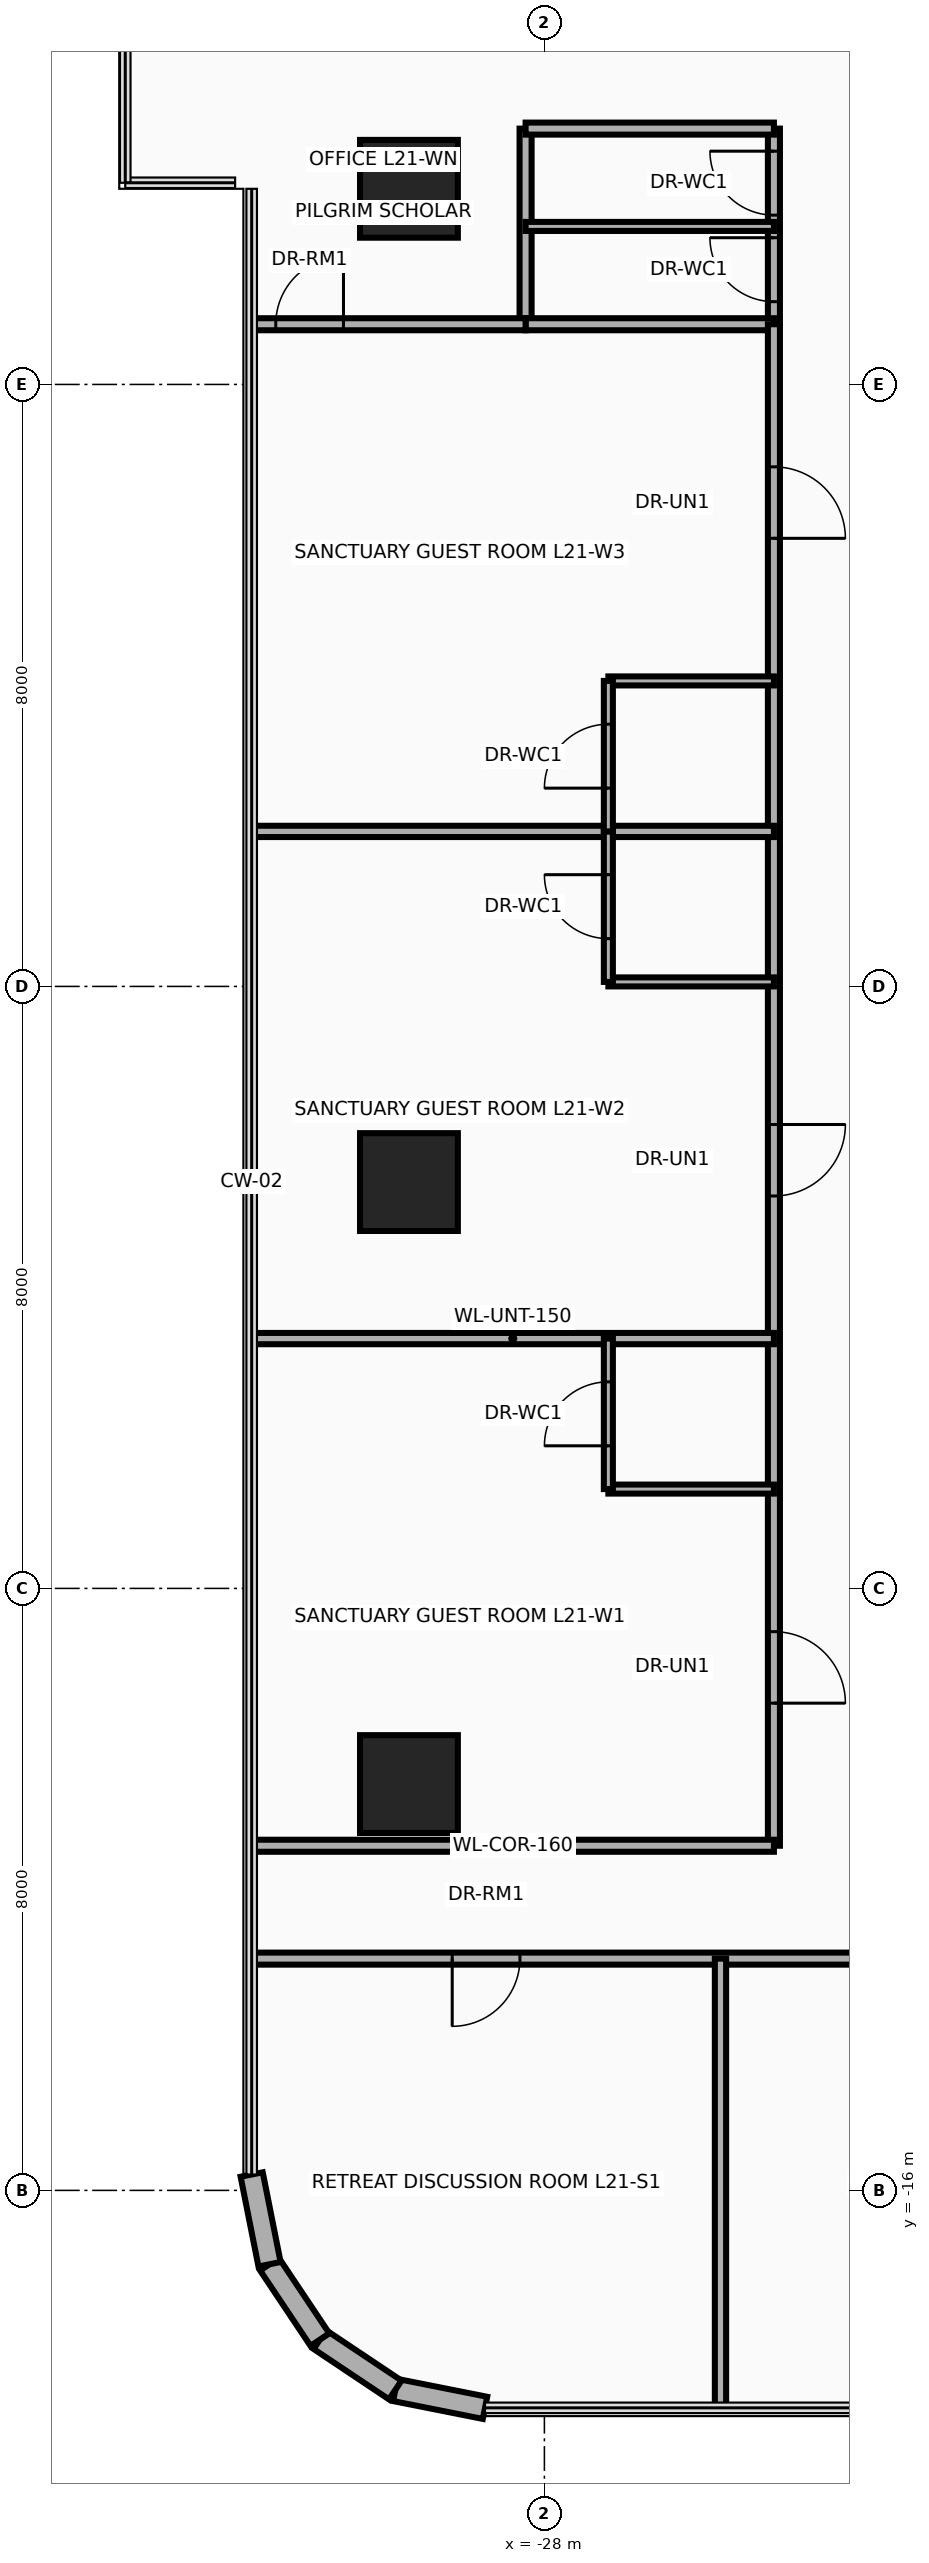
"""IFC4 building model, lengths in metres.
Left out: names, types, materials, properties, quantities, classifications, styles, units other than length and angle.
Written with IfcOpenShell. Run it as: python <this file> out.ifc"""

import sys

from ifc_helpers import new_model, si_unit, direction, frame, frame_2d, origin, origin_2d, place, context, subcontext, project, spatial, rectangle, circle, extrude, source, transform, mapped, element, fill, save


model = new_model("IFC4")
c1 = context("Model", 3, precision=1e-05, world=origin(), true_north=direction((0.0, 1.0)))
c2 = subcontext(c1, "Body", "Model", "MODEL_VIEW")
j1 = project(units=[si_unit("LENGTHUNIT", "METRE"), si_unit("PLANEANGLEUNIT", "RADIAN")], contexts=[c1])
p1 = place(None, origin())
s1 = spatial("IfcSite", under=j1, at=p1, CompositionType="ELEMENT")
p2 = place(p1, origin())
s2 = spatial("IfcBuilding", under=s1, at=p2, CompositionType="ELEMENT")
p3 = place(p2, frame((0.0, 0.0, 85.2)))
s3 = spatial("IfcBuildingStorey", under=s2, at=p3, CompositionType="ELEMENT", Elevation=85.2)
m1 = source(origin(), c2, "Body", "SweptSolid", [
    extrude(circle(Radius=0.65, at=origin_2d()), origin(), (0.0, 0.0, 1.0), 3.7),
])
for number, where, z_axis, x_axis in (
    (1, (-29.8, -10.6, 0.0), (0.0, 0.0, 1.0), (1.0, 0.0, 0.0)),
    (2, (-29.8, -2.6, 0.0), (0.0, 0.0, 1.0), (1.0, 0.0, 0.0)),
    (3, (-29.8, 10.6, 0.0), (0.0, 0.0, 1.0), (1.0, 0.0, 0.0)),
):
    element("IfcColumn", number, at=place(p3, frame(where, z_axis=z_axis, x_axis=x_axis)), inside=s3, PredefinedType="COLUMN", context=c2, shape_type="MappedRepresentation", body=[
        mapped(m1, transform((0.0, 0.0, 0.0), x_axis=(1.0, 0.0, 0.0), y_axis=(0.0, 1.0, 0.0), z_axis=(0.0, 0.0, 1.0), scale=1.0)),
    ])
p4 = place(p3, frame((-28.789, -18.89, 0.0), z_axis=(0.0, 0.0, 1.0), x_axis=(-0.980804027463, 0.194996050505, 0.0)))
e4 = element("IfcWall", 4, at=p4, inside=s3, PredefinedType="SOLIDWALL", context=c2, shape_type="SweptSolid", body=[
    extrude(rectangle(XDim=1.216, YDim=0.3, at=frame_2d((0.608, 0.0))), origin(), (0.0, 0.0, 1.0), 3.46),
])
for number, where, z_axis, x_axis in (
    (5, (-29.982, -18.653, 0.0), (0.0, 0.0, 1.0), (-0.831, 0.556, 0.0)),
    (6, (-30.983, -17.983, 0.0), (0.0, 0.0, 1.0), (-0.556, 0.831, 0.0)),
):
    element("IfcWall", number, at=place(p3, frame(where, z_axis=z_axis, x_axis=x_axis)), inside=s3, PredefinedType="SOLIDWALL", context=c2, shape_type="SweptSolid", body=[
        extrude(rectangle(XDim=1.205, YDim=0.3, at=frame_2d((0.603, 0.0))), origin(), (0.0, 0.0, 1.0), 3.46),
    ])
p5 = place(p3, frame((-31.653, -16.982, 0.0), z_axis=(0.0, 0.0, 1.0), x_axis=(-0.194996050505, 0.980804027463, 0.0)))
e7 = element("IfcWall", 7, at=p5, inside=s3, PredefinedType="SOLIDWALL", context=c2, shape_type="SweptSolid", body=[
    extrude(rectangle(XDim=1.216, YDim=0.3, at=frame_2d((0.608, 0.0))), origin(), (0.0, 0.0, 1.0), 3.46),
])
p6 = place(p3, frame((-28.25, 8.8, 0.0), z_axis=(0.0, 0.0, 1.0), x_axis=(0.0, 1.0, 0.0)))
e8 = element("IfcWall", 8, at=p6, inside=s3, PredefinedType="PARTITIONING", context=c2, shape_type="SweptSolid", body=[
    extrude(rectangle(XDim=2.6, YDim=0.16, at=frame_2d((1.3, 0.0))), origin(), (0.0, 0.0, 1.0), 2.583),
])
p7 = place(p3, frame((-24.95, 8.8, 0.0), z_axis=(0.0, 0.0, 1.0), x_axis=(0.0, 1.0, 0.0)))
e9 = element("IfcWall", 9, at=p7, inside=s3, PredefinedType="PARTITIONING", context=c2, shape_type="SweptSolid", body=[
    extrude(rectangle(XDim=2.6, YDim=0.16, at=frame_2d((1.3, 0.0))), origin(), (0.0, 0.0, 1.0), 2.583),
])
p8 = place(p7, frame((0.3, 0.0, 0.0)))
e10 = element("IfcOpeningElement", 10, at=p8, cuts=e9, PredefinedType="OPENING", context=c2, shape_type="SweptSolid", body=[
    extrude(rectangle(XDim=0.85, YDim=2.1, at=frame_2d((0.425, 1.05))), frame((0.0, 0.095, 0.0), z_axis=(0.0, -1.0, 0.0), x_axis=(1.0, 0.0, 0.0)), (0.0, 0.0, 1.0), 0.19),
])
p9 = place(p7, frame((1.45, 0.0, 0.0)))
e11 = element("IfcOpeningElement", 11, at=p9, cuts=e9, PredefinedType="OPENING", context=c2, shape_type="SweptSolid", body=[
    extrude(rectangle(XDim=0.85, YDim=2.1, at=frame_2d((0.425, 1.05))), frame((0.0, 0.095, 0.0), z_axis=(0.0, -1.0, 0.0), x_axis=(1.0, 0.0, 0.0)), (0.0, 0.0, 1.0), 0.19),
])
for number, where, z_axis, x_axis in (
    (12, (-28.25, 8.8, 0.0), (0.0, 0.0, 1.0), (1.0, 0.0, 0.0)),
    (13, (-28.25, 11.4, 0.0), (0.0, 0.0, 1.0), (1.0, 0.0, 0.0)),
):
    element("IfcWall", number, at=place(p3, frame(where, z_axis=z_axis, x_axis=x_axis)), inside=s3, PredefinedType="PARTITIONING", context=c2, shape_type="SweptSolid", body=[
        extrude(rectangle(XDim=3.3, YDim=0.16, at=frame_2d((1.65, 0.0))), origin(), (0.0, 0.0, 1.0), 3.46),
    ])
p10 = place(p3, frame((-28.25, 10.1, 0.0), z_axis=(0.0, 0.0, 1.0), x_axis=(1.0, 0.0, 0.0)))
e14 = element("IfcWall", 14, at=p10, inside=s3, PredefinedType="PARTITIONING", context=c2, shape_type="SweptSolid", body=[
    extrude(rectangle(XDim=3.3, YDim=0.12, at=frame_2d((1.65, 0.0))), origin(), (0.0, 0.0, 1.0), 3.46),
])
p11 = place(p3, frame((-24.95, -11.42, 0.0), z_axis=(0.0, 0.0, 1.0), x_axis=(0.0, 1.0, 0.0)))
e15 = element("IfcWall", 15, at=p11, inside=s3, PredefinedType="PARTITIONING", context=c2, shape_type="SweptSolid", body=[
    extrude(rectangle(XDim=20.22, YDim=0.16, at=frame_2d((10.11, 0.0))), origin(), (0.0, 0.0, 1.0), 2.583),
])
p12 = place(p11, frame((1.895, 0.0, 0.0)))
e16 = element("IfcOpeningElement", 16, at=p12, cuts=e15, PredefinedType="OPENING", context=c2, shape_type="SweptSolid", body=[
    extrude(rectangle(XDim=0.95, YDim=2.15, at=frame_2d((0.475, 1.075))), frame((0.0, 0.095, 0.0), z_axis=(0.0, -1.0, 0.0), x_axis=(1.0, 0.0, 0.0)), (0.0, 0.0, 1.0), 0.19),
])
p13 = place(p11, frame((8.635, 0.0, 0.0)))
e17 = element("IfcOpeningElement", 17, at=p13, cuts=e15, PredefinedType="OPENING", context=c2, shape_type="SweptSolid", body=[
    extrude(rectangle(XDim=0.95, YDim=2.15, at=frame_2d((0.475, 1.075))), frame((0.0, 0.095, 0.0), z_axis=(0.0, -1.0, 0.0), x_axis=(1.0, 0.0, 0.0)), (0.0, 0.0, 1.0), 0.19),
])
p14 = place(p11, frame((17.375, 0.0, 0.0)))
e18 = element("IfcOpeningElement", 18, at=p14, cuts=e15, PredefinedType="OPENING", context=c2, shape_type="SweptSolid", body=[
    extrude(rectangle(XDim=0.95, YDim=2.15, at=frame_2d((0.475, 1.075))), frame((0.0, 0.095, 0.0), z_axis=(0.0, -1.0, 0.0), x_axis=(1.0, 0.0, 0.0)), (0.0, 0.0, 1.0), 0.19),
])
p15 = place(p3, frame((-31.89, 8.8, 0.0), z_axis=(0.0, 0.0, 1.0), x_axis=(1.0, 0.0, 0.0)))
e19 = element("IfcWall", 19, at=p15, inside=s3, PredefinedType="PARTITIONING", context=c2, shape_type="SweptSolid", body=[
    extrude(rectangle(XDim=3.64, YDim=0.16, at=frame_2d((1.82, 0.0))), origin(), (0.0, 0.0, 1.0), 2.896),
])
p16 = place(p15, frame((0.32, 0.0, 0.0)))
e20 = element("IfcOpeningElement", 20, at=p16, cuts=e19, PredefinedType="OPENING", context=c2, shape_type="SweptSolid", body=[
    extrude(rectangle(XDim=0.9, YDim=2.1, at=frame_2d((0.45, 1.05))), frame((0.0, 0.095, 0.0), z_axis=(0.0, -1.0, 0.0), x_axis=(1.0, 0.0, 0.0)), (0.0, 0.0, 1.0), 0.19),
])
for number, where, z_axis, x_axis in (
    (21, (-31.89, -4.68, 0.0), (0.0, 0.0, 1.0), (1.0, 0.0, 0.0)),
    (22, (-31.89, 2.06, 0.0), (0.0, 0.0, 1.0), (1.0, 0.0, 0.0)),
):
    element("IfcWall", number, at=place(p3, frame(where, z_axis=z_axis, x_axis=x_axis)), inside=s3, PredefinedType="PARTITIONING", context=c2, shape_type="SweptSolid", body=[
        extrude(rectangle(XDim=6.94, YDim=0.15, at=frame_2d((3.47, 0.0))), origin(), (0.0, 0.0, 1.0), 2.896),
    ])
p17 = place(p3, frame((-27.15, -6.68, 0.0), z_axis=(0.0, 0.0, 1.0), x_axis=(1.0, 0.0, 0.0)))
e23 = element("IfcWall", 23, at=p17, inside=s3, PredefinedType="PARTITIONING", context=c2, shape_type="SweptSolid", body=[
    extrude(rectangle(XDim=2.2, YDim=0.12, at=frame_2d((1.1, 0.0))), origin(), (0.0, 0.0, 1.0), 2.979),
])
p18 = place(p3, frame((-27.15, -6.68, 0.0), z_axis=(0.0, 0.0, 1.0), x_axis=(0.0, 1.0, 0.0)))
e24 = element("IfcWall", 24, at=p18, inside=s3, PredefinedType="PARTITIONING", context=c2, shape_type="SweptSolid", body=[
    extrude(rectangle(XDim=2.0, YDim=0.12, at=frame_2d((1.0, 0.0))), origin(), (0.0, 0.0, 1.0), 2.979),
])
p19 = place(p18, frame((0.575, 0.0, 0.0)))
e25 = element("IfcOpeningElement", 25, at=p19, cuts=e24, PredefinedType="OPENING", context=c2, shape_type="SweptSolid", body=[
    extrude(rectangle(XDim=0.85, YDim=2.1, at=frame_2d((0.425, 1.05))), frame((0.0, 0.075, 0.0), z_axis=(0.0, -1.0, 0.0), x_axis=(1.0, 0.0, 0.0)), (0.0, 0.0, 1.0), 0.15),
])
p20 = place(p3, frame((-27.15, 0.06, 0.0), z_axis=(0.0, 0.0, 1.0), x_axis=(1.0, 0.0, 0.0)))
e26 = element("IfcWall", 26, at=p20, inside=s3, PredefinedType="PARTITIONING", context=c2, shape_type="SweptSolid", body=[
    extrude(rectangle(XDim=2.2, YDim=0.12, at=frame_2d((1.1, 0.0))), origin(), (0.0, 0.0, 1.0), 2.979),
])
p21 = place(p3, frame((-27.15, 0.06, 0.0), z_axis=(0.0, 0.0, 1.0), x_axis=(0.0, 1.0, 0.0)))
e27 = element("IfcWall", 27, at=p21, inside=s3, PredefinedType="PARTITIONING", context=c2, shape_type="SweptSolid", body=[
    extrude(rectangle(XDim=2.0, YDim=0.12, at=frame_2d((1.0, 0.0))), origin(), (0.0, 0.0, 1.0), 2.979),
])
p22 = place(p21, frame((0.575, 0.0, 0.0)))
e28 = element("IfcOpeningElement", 28, at=p22, cuts=e27, PredefinedType="OPENING", context=c2, shape_type="SweptSolid", body=[
    extrude(rectangle(XDim=0.85, YDim=2.1, at=frame_2d((0.425, 1.05))), frame((0.0, 0.075, 0.0), z_axis=(0.0, -1.0, 0.0), x_axis=(1.0, 0.0, 0.0)), (0.0, 0.0, 1.0), 0.15),
])
p23 = place(p3, frame((-27.15, 4.06, 0.0), z_axis=(0.0, 0.0, 1.0), x_axis=(1.0, 0.0, 0.0)))
e29 = element("IfcWall", 29, at=p23, inside=s3, PredefinedType="PARTITIONING", context=c2, shape_type="SweptSolid", body=[
    extrude(rectangle(XDim=2.2, YDim=0.12, at=frame_2d((1.1, 0.0))), origin(), (0.0, 0.0, 1.0), 3.46),
])
p24 = place(p3, frame((-27.15, 2.06, 0.0), z_axis=(0.0, 0.0, 1.0), x_axis=(0.0, 1.0, 0.0)))
e30 = element("IfcWall", 30, at=p24, inside=s3, PredefinedType="PARTITIONING", context=c2, shape_type="SweptSolid", body=[
    extrude(rectangle(XDim=2.0, YDim=0.12, at=frame_2d((1.0, 0.0))), origin(), (0.0, 0.0, 1.0), 2.979),
])
p25 = place(p24, frame((0.575, 0.0, 0.0)))
e31 = element("IfcOpeningElement", 31, at=p25, cuts=e30, PredefinedType="OPENING", context=c2, shape_type="SweptSolid", body=[
    extrude(rectangle(XDim=0.85, YDim=2.1, at=frame_2d((0.425, 1.05))), frame((0.0, 0.075, 0.0), z_axis=(0.0, -1.0, 0.0), x_axis=(1.0, 0.0, 0.0)), (0.0, 0.0, 1.0), 0.15),
])
p26 = place(p3, frame((-31.89, -12.92, 0.0), z_axis=(0.0, 0.0, 1.0), x_axis=(1.0, 0.0, 0.0)))
e32 = element("IfcWall", 32, at=p26, inside=s3, PredefinedType="PARTITIONING", context=c2, shape_type="SweptSolid", body=[
    extrude(rectangle(XDim=22.28, YDim=0.16, at=frame_2d((11.14, 0.0))), origin(), (0.0, 0.0, 1.0), 2.834),
])
p27 = place(p26, frame((2.665, 0.0, 0.0)))
e33 = element("IfcOpeningElement", 33, at=p27, cuts=e32, PredefinedType="OPENING", context=c2, shape_type="SweptSolid", body=[
    extrude(rectangle(XDim=0.9, YDim=2.1, at=frame_2d((0.45, 1.05))), frame((0.0, 0.095, 0.0), z_axis=(0.0, -1.0, 0.0), x_axis=(1.0, 0.0, 0.0)), (0.0, 0.0, 1.0), 0.19),
])
p28 = place(p26, frame((9.82, 0.0, 0.0)))
e34 = element("IfcOpeningElement", 34, at=p28, cuts=e32, PredefinedType="OPENING", context=c2, shape_type="SweptSolid", body=[
    extrude(rectangle(XDim=0.9, YDim=2.1, at=frame_2d((0.45, 1.05))), frame((0.0, 0.095, 0.0), z_axis=(0.0, -1.0, 0.0), x_axis=(1.0, 0.0, 0.0)), (0.0, 0.0, 1.0), 0.19),
])
p29 = place(p26, frame((17.845, 0.0, 0.0)))
e35 = element("IfcOpeningElement", 35, at=p29, cuts=e32, PredefinedType="OPENING", context=c2, shape_type="SweptSolid", body=[
    extrude(rectangle(XDim=0.9, YDim=2.1, at=frame_2d((0.45, 1.05))), frame((0.0, 0.095, 0.0), z_axis=(0.0, -1.0, 0.0), x_axis=(1.0, 0.0, 0.0)), (0.0, 0.0, 1.0), 0.19),
])
p30 = place(p3, frame((-25.66, -18.89, 0.0), z_axis=(0.0, 0.0, 1.0), x_axis=(0.0, 1.0, 0.0)))
e36 = element("IfcWall", 36, at=p30, inside=s3, PredefinedType="PARTITIONING", context=c2, shape_type="SweptSolid", body=[
    extrude(rectangle(XDim=5.97, YDim=0.15, at=frame_2d((2.985, 0.0))), origin(), (0.0, 0.0, 1.0), 3.46),
])
p31 = place(p3, frame((-31.89, -11.42, 0.0), z_axis=(0.0, 0.0, 1.0), x_axis=(1.0, 0.0, 0.0)))
e37 = element("IfcWall", 37, at=p31, inside=s3, PredefinedType="PARTITIONING", context=c2, shape_type="SweptSolid", body=[
    extrude(rectangle(XDim=6.94, YDim=0.16, at=frame_2d((3.47, 0.0))), origin(), (0.0, 0.0, 1.0), 3.46),
])
p32 = place(p8, origin())
e38 = element("IfcDoor", 38, at=p32, inside=s3, OperationType="SINGLE_SWING_RIGHT", PredefinedType="DOOR", context=c2, shape_type="SweptSolid", body=[
    extrude(rectangle(XDim=0.85, YDim=2.1, at=frame_2d((0.425, 1.05))), frame((0.0, 0.025, 0.0), z_axis=(0.0, -1.0, 0.0), x_axis=(1.0, 0.0, 0.0)), (0.0, 0.0, 1.0), 0.05),
])
fill(e10, e38)
p33 = place(p9, origin())
e39 = element("IfcDoor", 39, at=p33, inside=s3, OperationType="SINGLE_SWING_LEFT", PredefinedType="DOOR", context=c2, shape_type="SweptSolid", body=[
    extrude(rectangle(XDim=0.85, YDim=2.1, at=frame_2d((0.425, 1.05))), frame((0.0, 0.025, 0.0), z_axis=(0.0, -1.0, 0.0), x_axis=(1.0, 0.0, 0.0)), (0.0, 0.0, 1.0), 0.05),
])
fill(e11, e39)
p34 = place(p16, origin())
e40 = element("IfcDoor", 40, at=p34, inside=s3, OperationType="SINGLE_SWING_RIGHT", PredefinedType="DOOR", context=c2, shape_type="SweptSolid", body=[
    extrude(rectangle(XDim=0.9, YDim=2.1, at=frame_2d((0.45, 1.05))), frame((0.0, 0.025, 0.0), z_axis=(0.0, -1.0, 0.0), x_axis=(1.0, 0.0, 0.0)), (0.0, 0.0, 1.0), 0.05),
])
fill(e20, e40)
p35 = place(p12, frame((0.95, 0.0, 0.0), z_axis=(0.0, 0.0, 1.0), x_axis=(-1.0, 0.0, 0.0)))
e41 = element("IfcDoor", 41, at=p35, inside=s3, OperationType="SINGLE_SWING_LEFT", PredefinedType="DOOR", context=c2, shape_type="SweptSolid", body=[
    extrude(rectangle(XDim=0.95, YDim=2.15, at=frame_2d((0.475, 1.075))), frame((0.0, 0.025, 0.0), z_axis=(0.0, -1.0, 0.0), x_axis=(1.0, 0.0, 0.0)), (0.0, 0.0, 1.0), 0.05),
])
fill(e16, e41)
p36 = place(p19, origin())
e42 = element("IfcDoor", 42, at=p36, inside=s3, OperationType="SINGLE_SWING_RIGHT", PredefinedType="DOOR", context=c2, shape_type="SweptSolid", body=[
    extrude(rectangle(XDim=0.85, YDim=2.1, at=frame_2d((0.425, 1.05))), frame((0.0, 0.025, 0.0), z_axis=(0.0, -1.0, 0.0), x_axis=(1.0, 0.0, 0.0)), (0.0, 0.0, 1.0), 0.05),
])
fill(e25, e42)
p37 = place(p13, frame((0.95, 0.0, 0.0), z_axis=(0.0, 0.0, 1.0), x_axis=(-1.0, 0.0, 0.0)))
e43 = element("IfcDoor", 43, at=p37, inside=s3, OperationType="SINGLE_SWING_LEFT", PredefinedType="DOOR", context=c2, shape_type="SweptSolid", body=[
    extrude(rectangle(XDim=0.95, YDim=2.15, at=frame_2d((0.475, 1.075))), frame((0.0, 0.025, 0.0), z_axis=(0.0, -1.0, 0.0), x_axis=(1.0, 0.0, 0.0)), (0.0, 0.0, 1.0), 0.05),
])
fill(e17, e43)
p38 = place(p22, origin())
e44 = element("IfcDoor", 44, at=p38, inside=s3, OperationType="SINGLE_SWING_RIGHT", PredefinedType="DOOR", context=c2, shape_type="SweptSolid", body=[
    extrude(rectangle(XDim=0.85, YDim=2.1, at=frame_2d((0.425, 1.05))), frame((0.0, 0.025, 0.0), z_axis=(0.0, -1.0, 0.0), x_axis=(1.0, 0.0, 0.0)), (0.0, 0.0, 1.0), 0.05),
])
fill(e28, e44)
p39 = place(p14, frame((0.95, 0.0, 0.0), z_axis=(0.0, 0.0, 1.0), x_axis=(-1.0, 0.0, 0.0)))
e45 = element("IfcDoor", 45, at=p39, inside=s3, OperationType="SINGLE_SWING_LEFT", PredefinedType="DOOR", context=c2, shape_type="SweptSolid", body=[
    extrude(rectangle(XDim=0.95, YDim=2.15, at=frame_2d((0.475, 1.075))), frame((0.0, 0.025, 0.0), z_axis=(0.0, -1.0, 0.0), x_axis=(1.0, 0.0, 0.0)), (0.0, 0.0, 1.0), 0.05),
])
fill(e18, e45)
p40 = place(p25, origin())
e46 = element("IfcDoor", 46, at=p40, inside=s3, OperationType="SINGLE_SWING_RIGHT", PredefinedType="DOOR", context=c2, shape_type="SweptSolid", body=[
    extrude(rectangle(XDim=0.85, YDim=2.1, at=frame_2d((0.425, 1.05))), frame((0.0, 0.025, 0.0), z_axis=(0.0, -1.0, 0.0), x_axis=(1.0, 0.0, 0.0)), (0.0, 0.0, 1.0), 0.05),
])
fill(e31, e46)
p41 = place(p27, frame((0.9, 0.0, 0.0), z_axis=(0.0, 0.0, 1.0), x_axis=(-1.0, 0.0, 0.0)))
e47 = element("IfcDoor", 47, at=p41, inside=s3, OperationType="SINGLE_SWING_LEFT", PredefinedType="DOOR", context=c2, shape_type="SweptSolid", body=[
    extrude(rectangle(XDim=0.9, YDim=2.1, at=frame_2d((0.45, 1.05))), frame((0.0, 0.025, 0.0), z_axis=(0.0, -1.0, 0.0), x_axis=(1.0, 0.0, 0.0)), (0.0, 0.0, 1.0), 0.05),
])
fill(e33, e47)
save(model, sys.argv[1])
